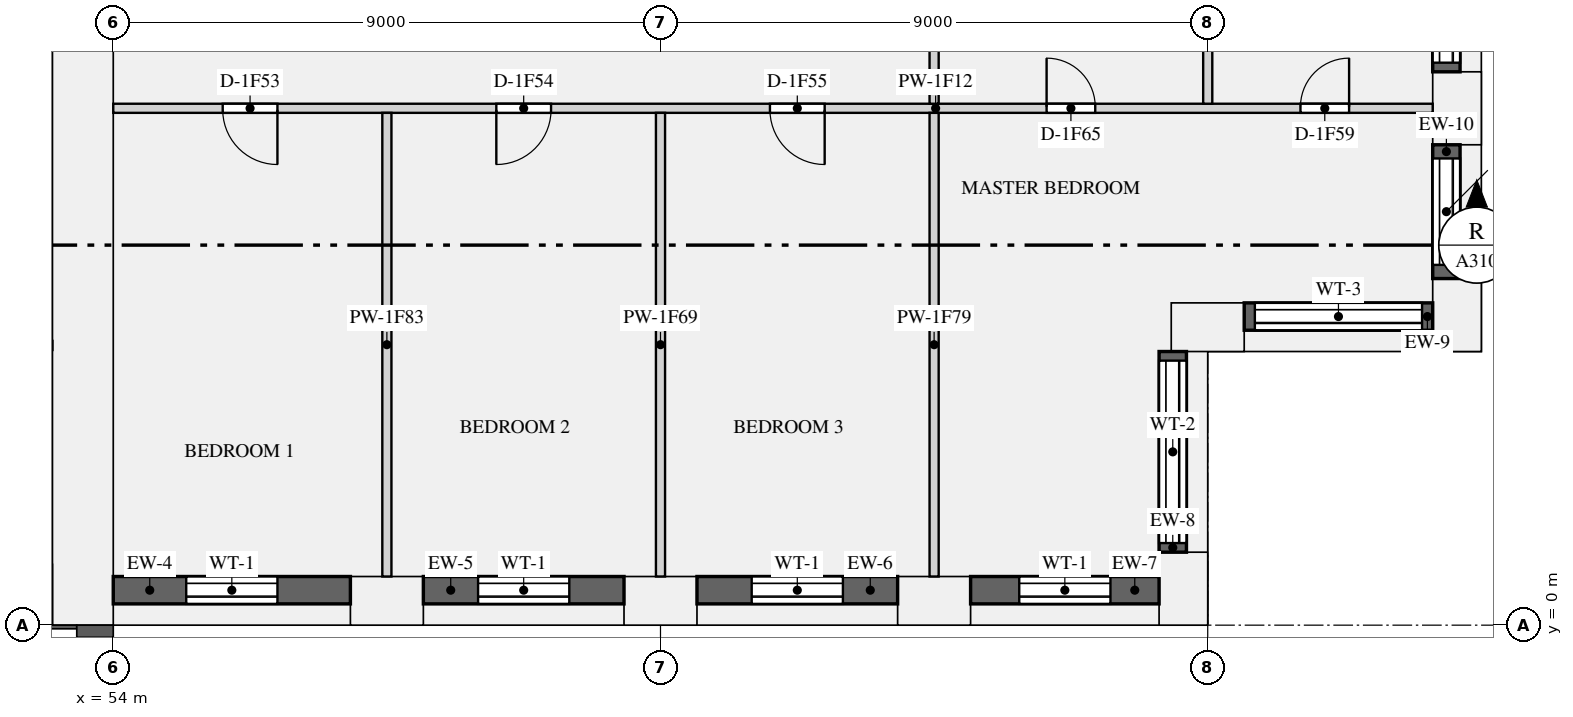
"""IFC4 building model, lengths in metres.
Left out: names, types, materials, properties, quantities, classifications, styles, units other than length and angle.
Written with IfcOpenShell. Run it as: python <this file> out.ifc"""

import sys

from ifc_helpers import new_model, si_unit, direction, frame, frame_2d, origin, origin_2d, place, context, subcontext, project, spatial, rectangle, extrude, element, fill, save


model = new_model("IFC4")
c1 = context("Model", 3, precision=1e-05, world=origin(), true_north=direction((0.0, 1.0)))
c2 = subcontext(c1, "Body", "Model", "MODEL_VIEW")
j1 = project(units=[si_unit("LENGTHUNIT", "METRE"), si_unit("PLANEANGLEUNIT", "RADIAN")], contexts=[c1])
p1 = place(None, origin())
s1 = spatial("IfcSite", under=j1, at=p1, CompositionType="ELEMENT")
p2 = place(p1, origin())
s2 = spatial("IfcBuilding", under=s1, at=p2, CompositionType="ELEMENT")
p3 = place(p2, frame((0.0, 0.0, 60.45)))
s3 = spatial("IfcBuildingStorey", under=s2, at=p3, CompositionType="ELEMENT", Elevation=60.45)
for number, where, z_axis, x_axis in (
    (1, (58.5, 0.4, 0.0), (0.0, 0.0, 1.0), (1.0, 0.0, 0.0)),
    (2, (63.0, 0.4, 0.0), (0.0, 0.0, 1.0), (1.0, 0.0, 0.0)),
    (3, (67.5, 0.4, 0.0), (0.0, 0.0, 1.0), (1.0, 0.0, 0.0)),
    (4, (71.6, 0.6, 0.0), (0.0, 0.0, 1.0), (0.0, 1.0, 0.0)),
    (5, (72.0, 4.9, 0.0), (0.0, 0.0, 1.0), (1.0, 0.0, 0.0)),
    (6, (76.1, 5.1, 0.0), (0.0, 0.0, 1.0), (0.0, 1.0, 0.0)),
    (7, (76.1, 8.5, 0.0), (0.0, 0.0, 1.0), (0.0, 1.0, 0.0)),
):
    element("IfcColumn", number, at=place(p3, frame(where, z_axis=z_axis, x_axis=x_axis)), inside=s3, PredefinedType="USERDEFINED", context=c2, shape_type="SweptSolid", body=[
        extrude(rectangle(XDim=1.2, YDim=0.8, at=origin_2d()), origin(), (0.0, 0.0, 1.0), 3.15),
    ])
p4 = place(p3, frame((53.5, 0.0, 0.0), z_axis=(0.0, 0.0, 1.0), x_axis=(0.0, 1.0, 0.0)))
e8 = element("IfcWall", 8, at=p4, inside=s3, PredefinedType="SHEAR", context=c2, shape_type="SweptSolid", body=[
    extrude(rectangle(XDim=12.5, YDim=1.0, at=frame_2d((6.25, 0.0))), origin(), (0.0, 0.0, 1.0), 3.15),
])
p5 = place(p3, frame((54.0, 0.575, 0.9), z_axis=(0.0, 0.0, 1.0), x_axis=(1.0, 0.0, 0.0)))
e9 = element("IfcWall", 9, at=p5, inside=s3, PredefinedType="SOLIDWALL", context=c2, shape_type="SweptSolid", body=[
    extrude(rectangle(XDim=3.9, YDim=0.45, at=frame_2d((1.95, 0.0))), origin(), (0.0, 0.0, 1.0), 1.93),
])
p6 = place(p5, frame((1.2, 0.0, 0.15)))
e10 = element("IfcOpeningElement", 10, at=p6, cuts=e9, PredefinedType="OPENING", context=c2, shape_type="SweptSolid", body=[
    extrude(rectangle(XDim=1.5, YDim=1.5, at=frame_2d((0.75, 0.75))), frame((0.0, 0.235, 0.0), z_axis=(0.0, -1.0, 0.0), x_axis=(1.0, 0.0, 0.0)), (0.0, 0.0, 1.0), 0.47),
])
p7 = place(p3, frame((59.1, 0.575, 0.9), z_axis=(0.0, 0.0, 1.0), x_axis=(1.0, 0.0, 0.0)))
e11 = element("IfcWall", 11, at=p7, inside=s3, PredefinedType="SOLIDWALL", context=c2, shape_type="SweptSolid", body=[
    extrude(rectangle(XDim=3.3, YDim=0.45, at=frame_2d((1.65, 0.0))), origin(), (0.0, 0.0, 1.0), 1.93),
])
p8 = place(p7, frame((0.9, 0.0, 0.15)))
e12 = element("IfcOpeningElement", 12, at=p8, cuts=e11, PredefinedType="OPENING", context=c2, shape_type="SweptSolid", body=[
    extrude(rectangle(XDim=1.5, YDim=1.5, at=frame_2d((0.75, 0.75))), frame((0.0, 0.235, 0.0), z_axis=(0.0, -1.0, 0.0), x_axis=(1.0, 0.0, 0.0)), (0.0, 0.0, 1.0), 0.47),
])
p9 = place(p3, frame((63.6, 0.575, 0.9), z_axis=(0.0, 0.0, 1.0), x_axis=(1.0, 0.0, 0.0)))
e13 = element("IfcWall", 13, at=p9, inside=s3, PredefinedType="SOLIDWALL", context=c2, shape_type="SweptSolid", body=[
    extrude(rectangle(XDim=3.3, YDim=0.45, at=frame_2d((1.65, 0.0))), origin(), (0.0, 0.0, 1.0), 1.93),
])
p10 = place(p9, frame((0.9, 0.0, 0.15)))
e14 = element("IfcOpeningElement", 14, at=p10, cuts=e13, PredefinedType="OPENING", context=c2, shape_type="SweptSolid", body=[
    extrude(rectangle(XDim=1.5, YDim=1.5, at=frame_2d((0.75, 0.75))), frame((0.0, 0.235, 0.0), z_axis=(0.0, -1.0, 0.0), x_axis=(1.0, 0.0, 0.0)), (0.0, 0.0, 1.0), 0.47),
])
p11 = place(p3, frame((68.1, 0.575, 0.9), z_axis=(0.0, 0.0, 1.0), x_axis=(1.0, 0.0, 0.0)))
e15 = element("IfcWall", 15, at=p11, inside=s3, PredefinedType="SOLIDWALL", context=c2, shape_type="SweptSolid", body=[
    extrude(rectangle(XDim=3.1, YDim=0.45, at=frame_2d((1.55, 0.0))), origin(), (0.0, 0.0, 1.0), 1.93),
])
p12 = place(p11, frame((0.8, 0.0, 0.15)))
e16 = element("IfcOpeningElement", 16, at=p12, cuts=e15, PredefinedType="OPENING", context=c2, shape_type="SweptSolid", body=[
    extrude(rectangle(XDim=1.5, YDim=1.5, at=frame_2d((0.75, 0.75))), frame((0.0, 0.235, 0.0), z_axis=(0.0, -1.0, 0.0), x_axis=(1.0, 0.0, 0.0)), (0.0, 0.0, 1.0), 0.47),
])
p13 = place(p3, frame((71.425, 1.2, 0.9), z_axis=(0.0, 0.0, 1.0), x_axis=(0.0, 1.0, 0.0)))
e17 = element("IfcWall", 17, at=p13, inside=s3, PredefinedType="SOLIDWALL", context=c2, shape_type="SweptSolid", body=[
    extrude(rectangle(XDim=3.3, YDim=0.45, at=frame_2d((1.65, 0.0))), origin(), (0.0, 0.0, 1.0), 1.93),
])
p14 = place(p13, frame((0.15, 0.0, 0.15)))
e18 = element("IfcOpeningElement", 18, at=p14, cuts=e17, PredefinedType="OPENING", context=c2, shape_type="SweptSolid", body=[
    extrude(rectangle(XDim=3.0, YDim=1.5, at=frame_2d((1.5, 0.75))), frame((0.0, 0.235, 0.0), z_axis=(0.0, -1.0, 0.0), x_axis=(1.0, 0.0, 0.0)), (0.0, 0.0, 1.0), 0.47),
])
p15 = place(p3, frame((72.6, 5.075, 0.9), z_axis=(0.0, 0.0, 1.0), x_axis=(1.0, 0.0, 0.0)))
e19 = element("IfcWall", 19, at=p15, inside=s3, PredefinedType="SOLIDWALL", context=c2, shape_type="SweptSolid", body=[
    extrude(rectangle(XDim=3.1, YDim=0.45, at=frame_2d((1.55, 0.0))), origin(), (0.0, 0.0, 1.0), 1.93),
])
p16 = place(p15, frame((0.175, 0.0, 0.15)))
e20 = element("IfcOpeningElement", 20, at=p16, cuts=e19, PredefinedType="OPENING", context=c2, shape_type="SweptSolid", body=[
    extrude(rectangle(XDim=2.75, YDim=1.5, at=frame_2d((1.375, 0.75))), frame((0.0, 0.235, 0.0), z_axis=(0.0, -1.0, 0.0), x_axis=(1.0, 0.0, 0.0)), (0.0, 0.0, 1.0), 0.47),
])
p17 = place(p3, frame((75.925, 5.7, 0.9), z_axis=(0.0, 0.0, 1.0), x_axis=(0.0, 1.0, 0.0)))
e21 = element("IfcWall", 21, at=p17, inside=s3, PredefinedType="SOLIDWALL", context=c2, shape_type="SweptSolid", body=[
    extrude(rectangle(XDim=2.2, YDim=0.45, at=frame_2d((1.1, 0.0))), origin(), (0.0, 0.0, 1.0), 1.93),
])
p18 = place(p17, frame((0.225, 0.0, 0.15)))
e22 = element("IfcOpeningElement", 22, at=p18, cuts=e21, PredefinedType="OPENING", context=c2, shape_type="SweptSolid", body=[
    extrude(rectangle(XDim=1.75, YDim=1.5, at=frame_2d((0.875, 0.75))), frame((0.0, 0.235, 0.0), z_axis=(0.0, -1.0, 0.0), x_axis=(1.0, 0.0, 0.0)), (0.0, 0.0, 1.0), 0.47),
])
p19 = place(p3, frame((75.925, 9.1, 0.9), z_axis=(0.0, 0.0, 1.0), x_axis=(0.0, 1.0, 0.0)))
e23 = element("IfcWall", 23, at=p19, inside=s3, PredefinedType="SOLIDWALL", context=c2, shape_type="SweptSolid", body=[
    extrude(rectangle(XDim=2.8, YDim=0.45, at=frame_2d((1.4, 0.0))), origin(), (0.0, 0.0, 1.0), 1.93),
])
p20 = place(p19, frame((0.15, 0.0, 0.15)))
e24 = element("IfcOpeningElement", 24, at=p20, cuts=e23, PredefinedType="OPENING", context=c2, shape_type="SweptSolid", body=[
    extrude(rectangle(XDim=2.5, YDim=1.5, at=frame_2d((1.25, 0.75))), frame((0.0, 0.235, 0.0), z_axis=(0.0, -1.0, 0.0), x_axis=(1.0, 0.0, 0.0)), (0.0, 0.0, 1.0), 0.47),
])
p21 = place(p3, frame((54.0, 8.5, 0.0), z_axis=(0.0, 0.0, 1.0), x_axis=(1.0, 0.0, 0.0)))
e25 = element("IfcWall", 25, at=p21, inside=s3, PredefinedType="PARTITIONING", context=c2, shape_type="SweptSolid", body=[
    extrude(rectangle(XDim=21.7, YDim=0.15, at=frame_2d((10.85, 0.0))), origin(), (0.0, 0.0, 1.0), 2.83),
])
p22 = place(p21, frame((1.8, 0.0, 0.0)))
e26 = element("IfcOpeningElement", 26, at=p22, cuts=e25, PredefinedType="OPENING", context=c2, shape_type="SweptSolid", body=[
    extrude(rectangle(XDim=0.9, YDim=2.1, at=frame_2d((0.45, 1.05))), frame((0.0, 0.085, 0.0), z_axis=(0.0, -1.0, 0.0), x_axis=(1.0, 0.0, 0.0)), (0.0, 0.0, 1.0), 0.17),
])
p23 = place(p21, frame((6.3, 0.0, 0.0)))
e27 = element("IfcOpeningElement", 27, at=p23, cuts=e25, PredefinedType="OPENING", context=c2, shape_type="SweptSolid", body=[
    extrude(rectangle(XDim=0.9, YDim=2.1, at=frame_2d((0.45, 1.05))), frame((0.0, 0.085, 0.0), z_axis=(0.0, -1.0, 0.0), x_axis=(1.0, 0.0, 0.0)), (0.0, 0.0, 1.0), 0.17),
])
p24 = place(p21, frame((10.8, 0.0, 0.0)))
e28 = element("IfcOpeningElement", 28, at=p24, cuts=e25, PredefinedType="OPENING", context=c2, shape_type="SweptSolid", body=[
    extrude(rectangle(XDim=0.9, YDim=2.1, at=frame_2d((0.45, 1.05))), frame((0.0, 0.085, 0.0), z_axis=(0.0, -1.0, 0.0), x_axis=(1.0, 0.0, 0.0)), (0.0, 0.0, 1.0), 0.17),
])
p25 = place(p21, frame((19.525, 0.0, 0.0)))
e29 = element("IfcOpeningElement", 29, at=p25, cuts=e25, PredefinedType="OPENING", context=c2, shape_type="SweptSolid", body=[
    extrude(rectangle(XDim=0.8, YDim=2.1, at=frame_2d((0.4, 1.05))), frame((0.0, 0.085, 0.0), z_axis=(0.0, -1.0, 0.0), x_axis=(1.0, 0.0, 0.0)), (0.0, 0.0, 1.0), 0.17),
])
p26 = place(p21, frame((15.35, 0.0, 0.0)))
e30 = element("IfcOpeningElement", 30, at=p26, cuts=e25, PredefinedType="OPENING", context=c2, shape_type="SweptSolid", body=[
    extrude(rectangle(XDim=0.8, YDim=2.1, at=frame_2d((0.4, 1.05))), frame((0.0, 0.085, 0.0), z_axis=(0.0, -1.0, 0.0), x_axis=(1.0, 0.0, 0.0)), (0.0, 0.0, 1.0), 0.17),
])
p27 = place(p3, frame((63.0, 0.8, 0.0), z_axis=(0.0, 0.0, 1.0), x_axis=(0.0, 1.0, 0.0)))
e31 = element("IfcWall", 31, at=p27, inside=s3, PredefinedType="PARTITIONING", context=c2, shape_type="SweptSolid", body=[
    extrude(rectangle(XDim=7.625, YDim=0.15, at=frame_2d((3.812, 0.0))), origin(), (0.0, 0.0, 1.0), 2.83),
])
p28 = place(p3, frame((72.0, 8.575, 0.0), z_axis=(0.0, 0.0, 1.0), x_axis=(0.0, 1.0, 0.0)))
e32 = element("IfcWall", 32, at=p28, inside=s3, PredefinedType="PARTITIONING", context=c2, shape_type="SweptSolid", body=[
    extrude(rectangle(XDim=3.85, YDim=0.15, at=frame_2d((1.925, 0.0))), origin(), (0.0, 0.0, 1.0), 2.83),
])
p29 = place(p28, frame((1.15, 0.0, 0.0)))
e33 = element("IfcOpeningElement", 33, at=p29, cuts=e32, PredefinedType="OPENING", context=c2, shape_type="SweptSolid", body=[
    extrude(rectangle(XDim=0.8, YDim=2.1, at=frame_2d((0.4, 1.05))), frame((0.0, 0.085, 0.0), z_axis=(0.0, -1.0, 0.0), x_axis=(1.0, 0.0, 0.0)), (0.0, 0.0, 1.0), 0.17),
])
p30 = place(p3, frame((67.5, 0.8, 0.0), z_axis=(0.0, 0.0, 1.0), x_axis=(0.0, 1.0, 0.0)))
e34 = element("IfcWall", 34, at=p30, inside=s3, PredefinedType="PARTITIONING", context=c2, shape_type="SweptSolid", body=[
    extrude(rectangle(XDim=7.625, YDim=0.15, at=frame_2d((3.812, 0.0))), origin(), (0.0, 0.0, 1.0), 2.83),
])
p31 = place(p3, frame((67.5, 8.575, 0.0), z_axis=(0.0, 0.0, 1.0), x_axis=(0.0, 1.0, 0.0)))
e35 = element("IfcWall", 35, at=p31, inside=s3, PredefinedType="PARTITIONING", context=c2, shape_type="SweptSolid", body=[
    extrude(rectangle(XDim=3.85, YDim=0.15, at=frame_2d((1.925, 0.0))), origin(), (0.0, 0.0, 1.0), 2.83),
])
p32 = place(p31, frame((1.525, 0.0, 0.0)))
e36 = element("IfcOpeningElement", 36, at=p32, cuts=e35, PredefinedType="OPENING", context=c2, shape_type="SweptSolid", body=[
    extrude(rectangle(XDim=0.8, YDim=2.1, at=frame_2d((0.4, 1.05))), frame((0.0, 0.085, 0.0), z_axis=(0.0, -1.0, 0.0), x_axis=(1.0, 0.0, 0.0)), (0.0, 0.0, 1.0), 0.17),
])
p33 = place(p3, frame((58.5, 0.8, 0.0), z_axis=(0.0, 0.0, 1.0), x_axis=(0.0, 1.0, 0.0)))
e37 = element("IfcWall", 37, at=p33, inside=s3, PredefinedType="PARTITIONING", context=c2, shape_type="SweptSolid", body=[
    extrude(rectangle(XDim=7.625, YDim=0.15, at=frame_2d((3.812, 0.0))), origin(), (0.0, 0.0, 1.0), 2.83),
])
p34 = place(p6, origin())
e38 = element("IfcWindow", 38, at=p34, inside=s3, PartitioningType="SINGLE_PANEL", PredefinedType="WINDOW", context=c2, shape_type="SweptSolid", body=[
    extrude(rectangle(XDim=1.5, YDim=1.5, at=frame_2d((0.75, 0.75))), frame((0.0, -0.065, 0.0), z_axis=(0.0, -1.0, 0.0), x_axis=(1.0, 0.0, 0.0)), (0.0, 0.0, 1.0), 0.06),
])
fill(e10, e38)
p35 = place(p8, origin())
e39 = element("IfcWindow", 39, at=p35, inside=s3, PartitioningType="SINGLE_PANEL", PredefinedType="WINDOW", context=c2, shape_type="SweptSolid", body=[
    extrude(rectangle(XDim=1.5, YDim=1.5, at=frame_2d((0.75, 0.75))), frame((0.0, -0.065, 0.0), z_axis=(0.0, -1.0, 0.0), x_axis=(1.0, 0.0, 0.0)), (0.0, 0.0, 1.0), 0.06),
])
fill(e12, e39)
p36 = place(p10, origin())
e40 = element("IfcWindow", 40, at=p36, inside=s3, PartitioningType="SINGLE_PANEL", PredefinedType="WINDOW", context=c2, shape_type="SweptSolid", body=[
    extrude(rectangle(XDim=1.5, YDim=1.5, at=frame_2d((0.75, 0.75))), frame((0.0, -0.065, 0.0), z_axis=(0.0, -1.0, 0.0), x_axis=(1.0, 0.0, 0.0)), (0.0, 0.0, 1.0), 0.06),
])
fill(e14, e40)
p37 = place(p12, origin())
e41 = element("IfcWindow", 41, at=p37, inside=s3, PartitioningType="SINGLE_PANEL", PredefinedType="WINDOW", context=c2, shape_type="SweptSolid", body=[
    extrude(rectangle(XDim=1.5, YDim=1.5, at=frame_2d((0.75, 0.75))), frame((0.0, -0.065, 0.0), z_axis=(0.0, -1.0, 0.0), x_axis=(1.0, 0.0, 0.0)), (0.0, 0.0, 1.0), 0.06),
])
fill(e16, e41)
p38 = place(p14, origin())
e42 = element("IfcWindow", 42, at=p38, inside=s3, PartitioningType="SINGLE_PANEL", PredefinedType="WINDOW", context=c2, shape_type="SweptSolid", body=[
    extrude(rectangle(XDim=3.0, YDim=1.5, at=frame_2d((1.5, 0.75))), frame((0.0, -0.065, 0.0), z_axis=(0.0, -1.0, 0.0), x_axis=(1.0, 0.0, 0.0)), (0.0, 0.0, 1.0), 0.06),
])
fill(e18, e42)
p39 = place(p16, origin())
e43 = element("IfcWindow", 43, at=p39, inside=s3, PartitioningType="SINGLE_PANEL", PredefinedType="WINDOW", context=c2, shape_type="SweptSolid", body=[
    extrude(rectangle(XDim=2.75, YDim=1.5, at=frame_2d((1.375, 0.75))), frame((0.0, -0.065, 0.0), z_axis=(0.0, -1.0, 0.0), x_axis=(1.0, 0.0, 0.0)), (0.0, 0.0, 1.0), 0.06),
])
fill(e20, e43)
p40 = place(p18, origin())
e44 = element("IfcWindow", 44, at=p40, inside=s3, PartitioningType="SINGLE_PANEL", PredefinedType="WINDOW", context=c2, shape_type="SweptSolid", body=[
    extrude(rectangle(XDim=1.75, YDim=1.5, at=frame_2d((0.875, 0.75))), frame((0.0, -0.065, 0.0), z_axis=(0.0, -1.0, 0.0), x_axis=(1.0, 0.0, 0.0)), (0.0, 0.0, 1.0), 0.06),
])
fill(e22, e44)
p41 = place(p20, origin())
e45 = element("IfcWindow", 45, at=p41, inside=s3, PartitioningType="SINGLE_PANEL", PredefinedType="WINDOW", context=c2, shape_type="SweptSolid", body=[
    extrude(rectangle(XDim=2.5, YDim=1.5, at=frame_2d((1.25, 0.75))), frame((0.0, -0.065, 0.0), z_axis=(0.0, -1.0, 0.0), x_axis=(1.0, 0.0, 0.0)), (0.0, 0.0, 1.0), 0.06),
])
fill(e24, e45)
p42 = place(p22, frame((0.9, 0.0, 0.0), z_axis=(0.0, 0.0, 1.0), x_axis=(-1.0, 0.0, 0.0)))
e46 = element("IfcDoor", 46, at=p42, inside=s3, OperationType="SINGLE_SWING_LEFT", PredefinedType="DOOR", context=c2, shape_type="SweptSolid", body=[
    extrude(rectangle(XDim=0.9, YDim=2.1, at=frame_2d((0.45, 1.05))), frame((0.0, 0.025, 0.0), z_axis=(0.0, -1.0, 0.0), x_axis=(1.0, 0.0, 0.0)), (0.0, 0.0, 1.0), 0.05),
])
fill(e26, e46)
p43 = place(p23, frame((0.9, 0.0, 0.0), z_axis=(0.0, 0.0, 1.0), x_axis=(-1.0, 0.0, 0.0)))
e47 = element("IfcDoor", 47, at=p43, inside=s3, OperationType="SINGLE_SWING_RIGHT", PredefinedType="DOOR", context=c2, shape_type="SweptSolid", body=[
    extrude(rectangle(XDim=0.9, YDim=2.1, at=frame_2d((0.45, 1.05))), frame((0.0, 0.025, 0.0), z_axis=(0.0, -1.0, 0.0), x_axis=(1.0, 0.0, 0.0)), (0.0, 0.0, 1.0), 0.05),
])
fill(e27, e47)
p44 = place(p24, frame((0.9, 0.0, 0.0), z_axis=(0.0, 0.0, 1.0), x_axis=(-1.0, 0.0, 0.0)))
e48 = element("IfcDoor", 48, at=p44, inside=s3, OperationType="SINGLE_SWING_LEFT", PredefinedType="DOOR", context=c2, shape_type="SweptSolid", body=[
    extrude(rectangle(XDim=0.9, YDim=2.1, at=frame_2d((0.45, 1.05))), frame((0.0, 0.025, 0.0), z_axis=(0.0, -1.0, 0.0), x_axis=(1.0, 0.0, 0.0)), (0.0, 0.0, 1.0), 0.05),
])
fill(e28, e48)
p45 = place(p25, origin())
e49 = element("IfcDoor", 49, at=p45, inside=s3, OperationType="SINGLE_SWING_RIGHT", PredefinedType="DOOR", context=c2, shape_type="SweptSolid", body=[
    extrude(rectangle(XDim=0.8, YDim=2.1, at=frame_2d((0.4, 1.05))), frame((0.0, 0.025, 0.0), z_axis=(0.0, -1.0, 0.0), x_axis=(1.0, 0.0, 0.0)), (0.0, 0.0, 1.0), 0.05),
])
fill(e29, e49)
p46 = place(p26, origin())
e50 = element("IfcDoor", 50, at=p46, inside=s3, OperationType="SINGLE_SWING_LEFT", PredefinedType="DOOR", context=c2, shape_type="SweptSolid", body=[
    extrude(rectangle(XDim=0.8, YDim=2.1, at=frame_2d((0.4, 1.05))), frame((0.0, 0.025, 0.0), z_axis=(0.0, -1.0, 0.0), x_axis=(1.0, 0.0, 0.0)), (0.0, 0.0, 1.0), 0.05),
])
fill(e30, e50)
save(model, sys.argv[1])
